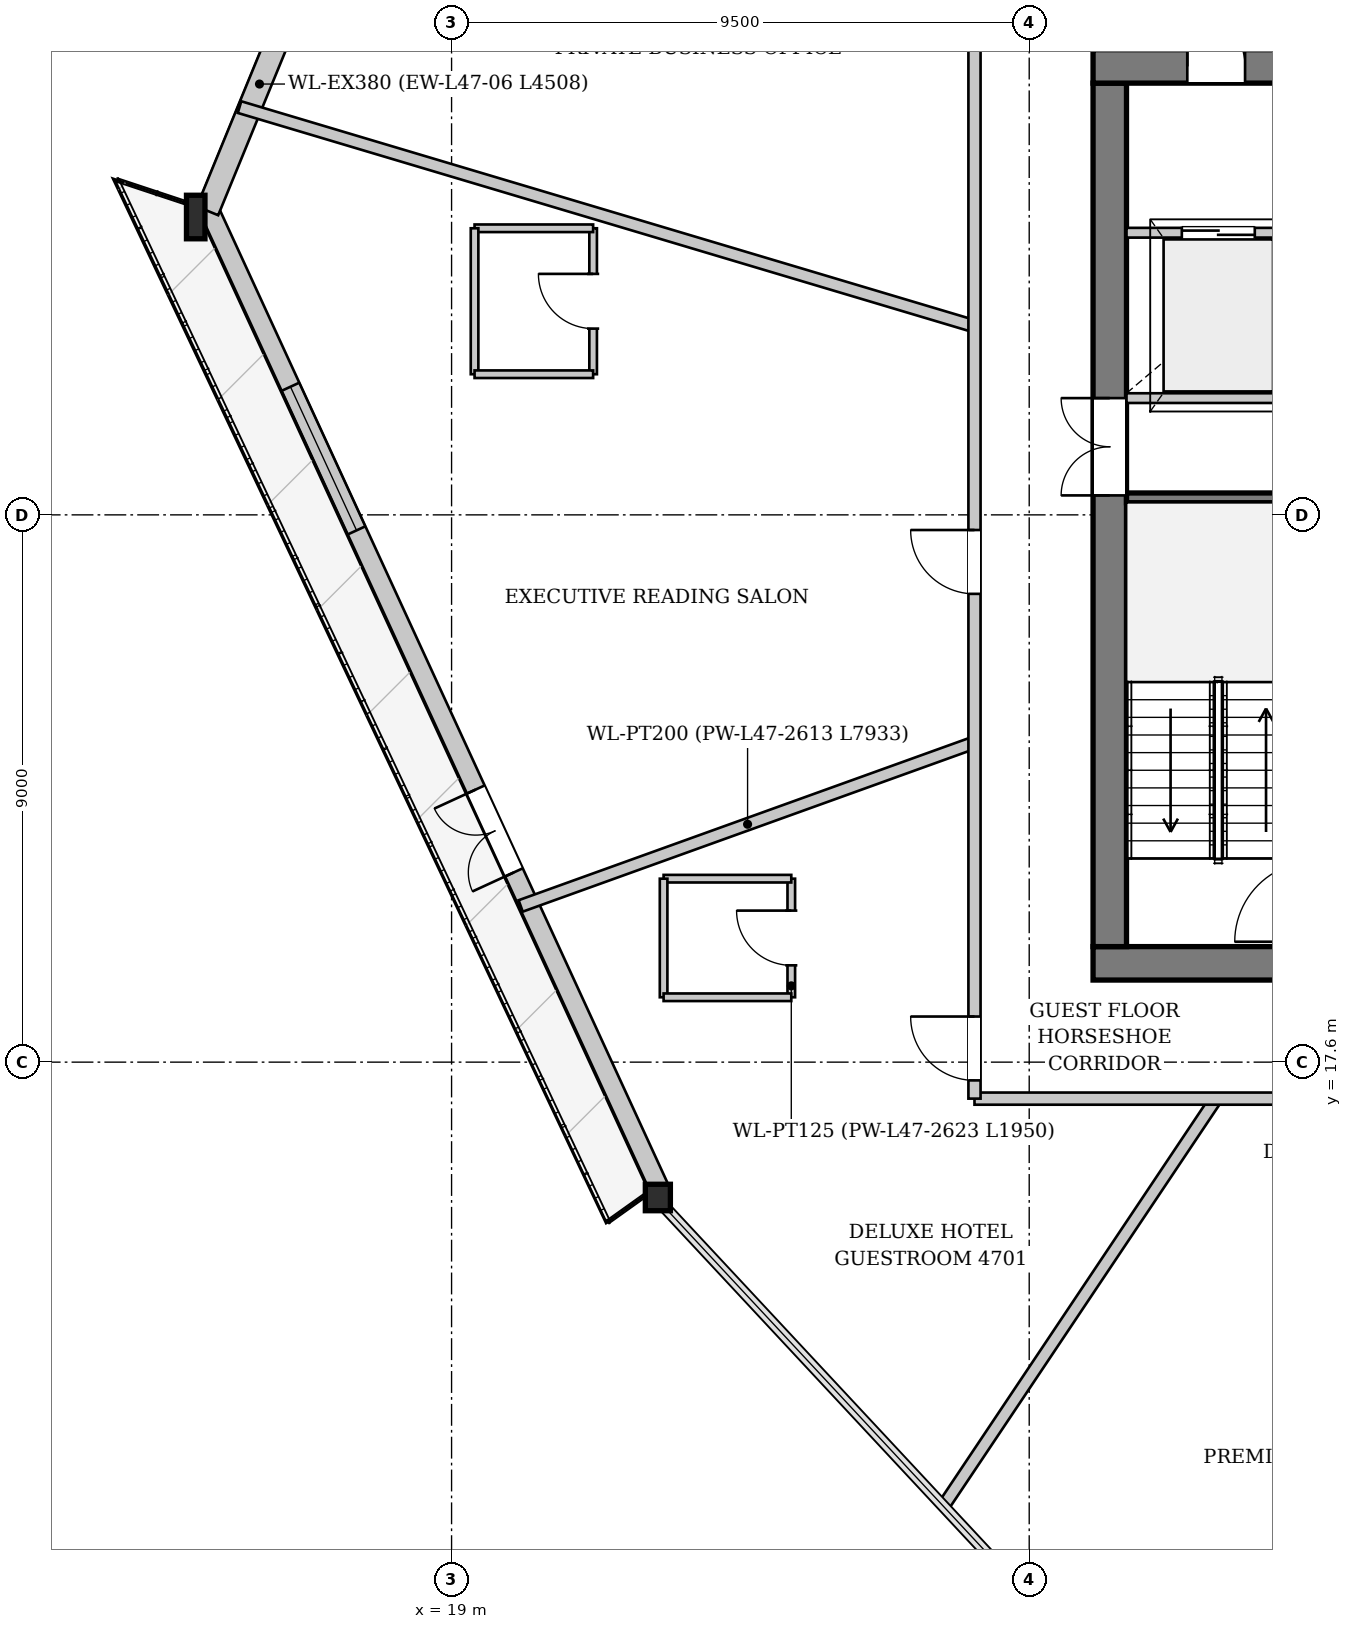
"""IFC4 building model, lengths in metres.
Left out: names, types, materials, properties, quantities, classifications, styles, units other than length and angle.
Written with IfcOpenShell. Run it as: python <this file> out.ifc"""

import sys

from ifc_helpers import new_model, si_unit, direction, frame, frame_2d, origin, origin_2d, place, context, subcontext, project, spatial, rectangle, i_section, extrude, source, transform, mapped, element, fill, save


model = new_model("IFC4")
c1 = context("Model", 3, precision=1e-05, world=origin(), true_north=direction((0.0, 1.0)))
c2 = subcontext(c1, "Body", "Model", "MODEL_VIEW")
j1 = project(units=[si_unit("LENGTHUNIT", "METRE"), si_unit("PLANEANGLEUNIT", "RADIAN")], contexts=[c1])
p1 = place(None, origin())
s1 = spatial("IfcSite", under=j1, at=p1, CompositionType="ELEMENT")
p2 = place(p1, origin())
s2 = spatial("IfcBuilding", under=s1, at=p2, CompositionType="ELEMENT")
p3 = place(p2, frame((0.0, 0.0, 178.55)))
s3 = spatial("IfcBuildingStorey", under=s2, at=p3, CompositionType="ELEMENT", Elevation=178.55)
m1 = source(origin(), c2, "Body", "SweptSolid", [
    extrude(i_section(OverallWidth=0.304, OverallDepth=0.716, WebThickness=0.021, FlangeThickness=0.04, at=origin_2d()), origin(), (0.0, 0.0, 1.0), 3.403),
])
p4 = place(p3, frame((14.81, 31.672, 0.0), z_axis=(-0.010402853053, -0.102019703729, 0.994727983269), x_axis=(0.994841349494, -0.101443034934, 0.0)))
e1 = element("IfcColumn", 1, at=p4, inside=s3, PredefinedType="COLUMN", context=c2, shape_type="MappedRepresentation", body=[
    mapped(m1, transform((0.0, 0.0, 0.0), x_axis=(1.0, 0.0, 0.0), y_axis=(0.0, 1.0, 0.0), z_axis=(0.0, 0.0, 1.0), scale=1.0)),
])
m2 = source(origin(), c2, "Body", "SweptSolid", [
    extrude(i_section(OverallWidth=0.412, OverallDepth=0.435, WebThickness=0.031, FlangeThickness=0.05, at=origin_2d()), origin(), (0.0, 0.0, 1.0), 3.4),
])
p5 = place(p3, frame((22.266, 15.469, 0.0), z_axis=(0.074538045011, -0.05615486628, 0.99563583244), x_axis=(0.601722210695, 0.798705440795, 0.0)))
e2 = element("IfcColumn", 2, at=p5, inside=s3, PredefinedType="COLUMN", context=c2, shape_type="MappedRepresentation", body=[
    mapped(m2, transform((0.0, 0.0, 0.0), x_axis=(1.0, 0.0, 0.0), y_axis=(0.0, 1.0, 0.0), z_axis=(0.0, 0.0, 1.0), scale=1.0)),
])
p6 = place(p3, frame((22.411, 15.536, 0.0), z_axis=(0.0, 0.0, 1.0), x_axis=(-0.418042306269, 0.90842755912, 0.0)))
e3 = element("IfcWall", 3, at=p6, inside=s3, PredefinedType="SOLIDWALL", context=c2, shape_type="SweptSolid", body=[
    extrude(rectangle(XDim=17.836, YDim=0.32, at=frame_2d((8.918, 0.0))), origin(), (0.0, 0.0, 1.0), 2.722),
])
p7 = place(p6, frame((5.707, 0.0, 0.0)))
e4 = element("IfcOpeningElement", 4, at=p7, cuts=e3, PredefinedType="OPENING", context=c2, shape_type="SweptSolid", body=[
    extrude(rectangle(XDim=1.5, YDim=2.3, at=frame_2d((0.75, 1.15))), frame((0.0, 0.17, 0.0), z_axis=(0.0, -1.0, 0.0), x_axis=(1.0, 0.0, 0.0)), (0.0, 0.0, 1.0), 0.34),
])
p8 = place(p6, frame((11.898, 0.0, 0.252)))
e5 = element("IfcOpeningElement", 5, at=p8, cuts=e3, PredefinedType="OPENING", context=c2, shape_type="SweptSolid", body=[
    extrude(rectangle(XDim=2.6, YDim=2.35, at=frame_2d((1.3, 1.175))), frame((0.0, 0.17, 0.0), z_axis=(0.0, -1.0, 0.0), x_axis=(1.0, 0.0, 0.0)), (0.0, 0.0, 1.0), 0.34),
])
p9 = place(p3, frame((14.986, 31.6, 0.0), z_axis=(0.0, 0.0, 1.0), x_axis=(0.379425607081, 0.925222248269, 0.0)))
e6 = element("IfcWall", 6, at=p9, inside=s3, PredefinedType="SOLIDWALL", context=c2, shape_type="SweptSolid", body=[
    extrude(rectangle(XDim=4.508, YDim=0.38, at=frame_2d((2.254, 0.0))), origin(), (0.0, 0.0, 1.0), 2.722),
])
p10 = place(p3, frame((46.45, 19.225, 0.0), z_axis=(0.0, 0.0, 1.0), x_axis=(-1.0, 0.0, 0.0)))
e7 = element("IfcWall", 7, at=p10, inside=s3, PredefinedType="SHEAR", context=c2, shape_type="SweptSolid", body=[
    extrude(rectangle(XDim=16.9, YDim=0.55, at=frame_2d((8.45, 0.0))), origin(), (0.0, 0.0, 1.0), 3.33),
])
p11 = place(p10, frame((4.65, 0.0, 0.0)))
e8 = element("IfcOpeningElement", 8, at=p11, cuts=e7, PredefinedType="OPENING", context=c2, shape_type="SweptSolid", body=[
    extrude(rectangle(XDim=1.12, YDim=2.25, at=frame_2d((0.56, 1.125))), frame((0.0, 0.285, 0.0), z_axis=(0.0, -1.0, 0.0), x_axis=(1.0, 0.0, 0.0)), (0.0, 0.0, 1.0), 0.57),
])
p12 = place(p10, frame((11.15, 0.0, 0.0)))
e9 = element("IfcOpeningElement", 9, at=p12, cuts=e7, PredefinedType="OPENING", context=c2, shape_type="SweptSolid", body=[
    extrude(rectangle(XDim=1.12, YDim=2.25, at=frame_2d((0.56, 1.125))), frame((0.0, 0.285, 0.0), z_axis=(0.0, -1.0, 0.0), x_axis=(1.0, 0.0, 0.0)), (0.0, 0.0, 1.0), 0.57),
])
p13 = place(p3, frame((29.825, 19.5, 0.0), z_axis=(0.0, 0.0, 1.0), x_axis=(0.0, 1.0, 0.0)))
e10 = element("IfcWall", 10, at=p13, inside=s3, PredefinedType="SHEAR", context=c2, shape_type="SweptSolid", body=[
    extrude(rectangle(XDim=14.2, YDim=0.55, at=frame_2d((7.1, 0.0))), origin(), (0.0, 0.0, 1.0), 3.33),
])
p14 = place(p13, frame((7.42, 0.0, 0.0)))
e11 = element("IfcOpeningElement", 11, at=p14, cuts=e10, PredefinedType="OPENING", context=c2, shape_type="SweptSolid", body=[
    extrude(rectangle(XDim=1.6, YDim=2.2, at=frame_2d((0.8, 1.1))), frame((0.0, 0.285, 0.0), z_axis=(0.0, -1.0, 0.0), x_axis=(1.0, 0.0, 0.0)), (0.0, 0.0, 1.0), 0.57),
])
p15 = place(p3, frame((29.55, 33.975, 0.0), z_axis=(0.0, 0.0, 1.0), x_axis=(1.0, 0.0, 0.0)))
e12 = element("IfcWall", 12, at=p15, inside=s3, PredefinedType="SHEAR", context=c2, shape_type="SweptSolid", body=[
    extrude(rectangle(XDim=16.9, YDim=0.55, at=frame_2d((8.45, 0.0))), origin(), (0.0, 0.0, 1.0), 3.33),
])
p16 = place(p15, frame((1.55, 0.0, 0.0)))
e13 = element("IfcOpeningElement", 13, at=p16, cuts=e12, PredefinedType="OPENING", context=c2, shape_type="SweptSolid", body=[
    extrude(rectangle(XDim=0.95, YDim=2.1, at=frame_2d((0.475, 1.05))), frame((0.0, 0.285, 0.0), z_axis=(0.0, -1.0, 0.0), x_axis=(1.0, 0.0, 0.0)), (0.0, 0.0, 1.0), 0.57),
])
p17 = place(p15, frame((3.93, 0.0, 0.0)))
e14 = element("IfcOpeningElement", 14, at=p17, cuts=e12, PredefinedType="OPENING", context=c2, shape_type="SweptSolid", body=[
    extrude(rectangle(XDim=1.32, YDim=2.2, at=frame_2d((0.66, 1.1))), frame((0.0, 0.285, 0.0), z_axis=(0.0, -1.0, 0.0), x_axis=(1.0, 0.0, 0.0)), (0.0, 0.0, 1.0), 0.57),
])
for number, where, z_axis, x_axis in (
    (15, (30.1, 26.88, 0.0), (0.0, 0.0, 1.0), (1.0, 0.0, 0.0)),
    (16, (30.1, 28.52, 0.0), (0.0, 0.0, 1.0), (1.0, 0.0, 0.0)),
):
    element("IfcWall", number, at=place(p3, frame(where, z_axis=z_axis, x_axis=x_axis)), inside=s3, PredefinedType="PARTITIONING", context=c2, shape_type="SweptSolid", body=[
        extrude(rectangle(XDim=3.02, YDim=0.16, at=frame_2d((1.51, 0.0))), origin(), (0.0, 0.0, 1.0), 3.33),
    ])
p18 = place(p3, frame((30.1, 31.24, 0.0), z_axis=(0.0, 0.0, 1.0), x_axis=(1.0, 0.0, 0.0)))
e17 = element("IfcWall", 17, at=p18, inside=s3, PredefinedType="PARTITIONING", context=c2, shape_type="SweptSolid", body=[
    extrude(rectangle(XDim=3.02, YDim=0.16, at=frame_2d((1.51, 0.0))), origin(), (0.0, 0.0, 1.0), 3.33),
])
p19 = place(p18, frame((0.91, 0.0, 0.0)))
e18 = element("IfcOpeningElement", 18, at=p19, cuts=e17, PredefinedType="OPENING", context=c2, shape_type="SweptSolid", body=[
    extrude(rectangle(XDim=1.2, YDim=2.2, at=frame_2d((0.6, 1.1))), frame((0.0, 0.09, 0.0), z_axis=(0.0, -1.0, 0.0), x_axis=(1.0, 0.0, 0.0)), (0.0, 0.0, 1.0), 0.18),
])
p20 = place(p3, frame((27.6, 22.856, 0.0), z_axis=(0.0, 0.0, 1.0), x_axis=(-0.94088309604, -0.338731456446, 0.0)))
e19 = element("IfcWall", 19, at=p20, inside=s3, PredefinedType="PARTITIONING", context=c2, shape_type="SweptSolid", body=[
    extrude(rectangle(XDim=7.933, YDim=0.2, at=frame_2d((3.966, 0.0))), origin(), (0.0, 0.0, 1.0), 3.33),
])
p21 = place(p3, frame((31.574, 17.0, 0.0), z_axis=(0.0, 0.0, 1.0), x_axis=(-0.556234798173, -0.831025179704, 0.0)))
e20 = element("IfcWall", 20, at=p21, inside=s3, PredefinedType="PARTITIONING", context=c2, shape_type="SweptSolid", body=[
    extrude(rectangle(XDim=8.035, YDim=0.2, at=frame_2d((4.018, 0.0))), origin(), (0.0, 0.0, 1.0), 3.33),
])
p22 = place(p3, frame((27.6, 29.701, 0.0), z_axis=(0.0, 0.0, 1.0), x_axis=(-0.958300687038, 0.285761777048, 0.0)))
e21 = element("IfcWall", 21, at=p22, inside=s3, PredefinedType="PARTITIONING", context=c2, shape_type="SweptSolid", body=[
    extrude(rectangle(XDim=12.614, YDim=0.2, at=frame_2d((6.307, 0.0))), origin(), (0.0, 0.0, 1.0), 3.33),
])
p23 = place(p3, frame((24.587, 18.667, 0.0), z_axis=(0.0, 0.0, 1.0), x_axis=(0.0, 1.0, 0.0)))
e22 = element("IfcWall", 22, at=p23, inside=s3, PredefinedType="PARTITIONING", context=c2, shape_type="SweptSolid", body=[
    extrude(rectangle(XDim=1.95, YDim=0.125, at=frame_2d((0.975, 0.0))), origin(), (0.0, 0.0, 1.0), 2.955),
])
p24 = place(p23, frame((0.525, 0.0, 0.0)))
e23 = element("IfcOpeningElement", 23, at=p24, cuts=e22, PredefinedType="OPENING", context=c2, shape_type="SweptSolid", body=[
    extrude(rectangle(XDim=0.9, YDim=2.1, at=frame_2d((0.45, 1.05))), frame((0.0, 0.073, 0.0), z_axis=(0.0, -1.0, 0.0), x_axis=(1.0, 0.0, 0.0)), (0.0, 0.0, 1.0), 0.145),
])
p25 = place(p3, frame((24.587, 20.617, 0.0), z_axis=(0.0, 0.0, 1.0), x_axis=(-1.0, 0.0, 0.0)))
e24 = element("IfcWall", 24, at=p25, inside=s3, PredefinedType="PARTITIONING", context=c2, shape_type="SweptSolid", body=[
    extrude(rectangle(XDim=2.1, YDim=0.125, at=frame_2d((1.05, 0.0))), origin(), (0.0, 0.0, 1.0), 3.33),
])
p26 = place(p3, frame((22.487, 20.617, 0.0), z_axis=(0.0, 0.0, 1.0), x_axis=(0.0, -1.0, 0.0)))
e25 = element("IfcWall", 25, at=p26, inside=s3, PredefinedType="PARTITIONING", context=c2, shape_type="SweptSolid", body=[
    extrude(rectangle(XDim=1.95, YDim=0.125, at=frame_2d((0.975, 0.0))), origin(), (0.0, 0.0, 1.0), 3.33),
])
p27 = place(p3, frame((22.487, 18.667, 0.0), z_axis=(0.0, 0.0, 1.0), x_axis=(1.0, 0.0, 0.0)))
e26 = element("IfcWall", 26, at=p27, inside=s3, PredefinedType="PARTITIONING", context=c2, shape_type="SweptSolid", body=[
    extrude(rectangle(XDim=2.1, YDim=0.125, at=frame_2d((1.05, 0.0))), origin(), (0.0, 0.0, 1.0), 3.33),
])
p28 = place(p3, frame((21.328, 28.913, 0.0), z_axis=(0.0, 0.0, 1.0), x_axis=(0.0, 1.0, 0.0)))
e27 = element("IfcWall", 27, at=p28, inside=s3, PredefinedType="PARTITIONING", context=c2, shape_type="SweptSolid", body=[
    extrude(rectangle(XDim=2.4, YDim=0.125, at=frame_2d((1.2, 0.0))), origin(), (0.0, 0.0, 1.0), 2.955),
])
p29 = place(p28, frame((0.75, 0.0, 0.0)))
e28 = element("IfcOpeningElement", 28, at=p29, cuts=e27, PredefinedType="OPENING", context=c2, shape_type="SweptSolid", body=[
    extrude(rectangle(XDim=0.9, YDim=2.1, at=frame_2d((0.45, 1.05))), frame((0.0, 0.073, 0.0), z_axis=(0.0, -1.0, 0.0), x_axis=(1.0, 0.0, 0.0)), (0.0, 0.0, 1.0), 0.145),
])
p30 = place(p3, frame((21.328, 31.313, 0.0), z_axis=(0.0, 0.0, 1.0), x_axis=(-1.0, 0.0, 0.0)))
e29 = element("IfcWall", 29, at=p30, inside=s3, PredefinedType="PARTITIONING", context=c2, shape_type="SweptSolid", body=[
    extrude(rectangle(XDim=1.95, YDim=0.125, at=frame_2d((0.975, 0.0))), origin(), (0.0, 0.0, 1.0), 3.33),
])
p31 = place(p3, frame((19.378, 31.313, 0.0), z_axis=(0.0, 0.0, 1.0), x_axis=(0.0, -1.0, 0.0)))
e30 = element("IfcWall", 30, at=p31, inside=s3, PredefinedType="PARTITIONING", context=c2, shape_type="SweptSolid", body=[
    extrude(rectangle(XDim=2.4, YDim=0.125, at=frame_2d((1.2, 0.0))), origin(), (0.0, 0.0, 1.0), 3.33),
])
p32 = place(p3, frame((19.378, 28.913, 0.0), z_axis=(0.0, 0.0, 1.0), x_axis=(1.0, 0.0, 0.0)))
e31 = element("IfcWall", 31, at=p32, inside=s3, PredefinedType="PARTITIONING", context=c2, shape_type="SweptSolid", body=[
    extrude(rectangle(XDim=1.95, YDim=0.125, at=frame_2d((0.975, 0.0))), origin(), (0.0, 0.0, 1.0), 3.33),
])
p33 = place(p3, frame((27.6, 17.0, 0.0), z_axis=(0.0, 0.0, 1.0), x_axis=(1.0, 0.0, 0.0)))
e32 = element("IfcWall", 32, at=p33, inside=s3, PredefinedType="PARTITIONING", context=c2, shape_type="SweptSolid", body=[
    extrude(rectangle(XDim=20.8, YDim=0.2, at=frame_2d((10.4, 0.0))), origin(), (0.0, 0.0, 1.0), 3.33),
])
p34 = place(p33, frame((5.92, 0.0, 0.0)))
e33 = element("IfcOpeningElement", 33, at=p34, cuts=e32, PredefinedType="OPENING", context=c2, shape_type="SweptSolid", body=[
    extrude(rectangle(XDim=1.05, YDim=2.2, at=frame_2d((0.525, 1.1))), frame((0.0, 0.11, 0.0), z_axis=(0.0, -1.0, 0.0), x_axis=(1.0, 0.0, 0.0)), (0.0, 0.0, 1.0), 0.22),
])
p35 = place(p33, frame((14.844, 0.0, 0.0)))
e34 = element("IfcOpeningElement", 34, at=p35, cuts=e32, PredefinedType="OPENING", context=c2, shape_type="SweptSolid", body=[
    extrude(rectangle(XDim=1.05, YDim=2.2, at=frame_2d((0.525, 1.1))), frame((0.0, 0.11, 0.0), z_axis=(0.0, -1.0, 0.0), x_axis=(1.0, 0.0, 0.0)), (0.0, 0.0, 1.0), 0.22),
])
p36 = place(p33, frame((19.45, 0.0, 0.0)))
e35 = element("IfcOpeningElement", 35, at=p36, cuts=e32, PredefinedType="OPENING", context=c2, shape_type="SweptSolid", body=[
    extrude(rectangle(XDim=1.05, YDim=2.2, at=frame_2d((0.525, 1.1))), frame((0.0, 0.11, 0.0), z_axis=(0.0, -1.0, 0.0), x_axis=(1.0, 0.0, 0.0)), (0.0, 0.0, 1.0), 0.22),
])
p37 = place(p3, frame((27.6, 17.0, 0.0), z_axis=(0.0, 0.0, 1.0), x_axis=(0.0, 1.0, 0.0)))
e36 = element("IfcWall", 36, at=p37, inside=s3, PredefinedType="PARTITIONING", context=c2, shape_type="SweptSolid", body=[
    extrude(rectangle(XDim=19.2, YDim=0.2, at=frame_2d((9.6, 0.0))), origin(), (0.0, 0.0, 1.0), 3.33),
])
p38 = place(p37, frame((0.3, 0.0, 0.0)))
e37 = element("IfcOpeningElement", 37, at=p38, cuts=e36, PredefinedType="OPENING", context=c2, shape_type="SweptSolid", body=[
    extrude(rectangle(XDim=1.05, YDim=2.2, at=frame_2d((0.525, 1.1))), frame((0.0, 0.11, 0.0), z_axis=(0.0, -1.0, 0.0), x_axis=(1.0, 0.0, 0.0)), (0.0, 0.0, 1.0), 0.22),
])
p39 = place(p37, frame((17.85, 0.0, 0.0)))
e38 = element("IfcOpeningElement", 38, at=p39, cuts=e36, PredefinedType="OPENING", context=c2, shape_type="SweptSolid", body=[
    extrude(rectangle(XDim=1.05, YDim=2.2, at=frame_2d((0.525, 1.1))), frame((0.0, 0.11, 0.0), z_axis=(0.0, -1.0, 0.0), x_axis=(1.0, 0.0, 0.0)), (0.0, 0.0, 1.0), 0.22),
])
p40 = place(p37, frame((8.301, 0.0, 0.0)))
e39 = element("IfcOpeningElement", 39, at=p40, cuts=e36, PredefinedType="OPENING", context=c2, shape_type="SweptSolid", body=[
    extrude(rectangle(XDim=1.05, YDim=2.2, at=frame_2d((0.525, 1.1))), frame((0.0, 0.11, 0.0), z_axis=(0.0, -1.0, 0.0), x_axis=(1.0, 0.0, 0.0)), (0.0, 0.0, 1.0), 0.22),
])
m3 = source(origin(), c2, "Body", "SweptSolid", [
    extrude(rectangle(XDim=1.5, YDim=2.3, at=frame_2d((0.75, 1.15))), frame((0.0, 0.025, 0.0), z_axis=(0.0, -1.0, 0.0), x_axis=(1.0, 0.0, 0.0)), (0.0, 0.0, 1.0), 0.05),
])
p41 = place(p7, origin())
e40 = element("IfcDoor", 40, at=p41, inside=s3, OperationType="DOUBLE_DOOR_SINGLE_SWING", PredefinedType="DOOR", context=c2, shape_type="MappedRepresentation", body=[
    mapped(m3, transform((0.0, 0.0, 0.0), x_axis=(1.0, 0.0, 0.0), y_axis=(0.0, 1.0, 0.0), z_axis=(0.0, 0.0, 1.0), scale=1.0)),
])
fill(e4, e40)
m4 = source(origin(), c2, "Body", "SweptSolid", [
    extrude(rectangle(XDim=2.6, YDim=2.35, at=frame_2d((1.3, 1.175))), frame((0.0, 0.03, 0.0), z_axis=(0.0, -1.0, 0.0), x_axis=(1.0, 0.0, 0.0)), (0.0, 0.0, 1.0), 0.06),
])
p42 = place(p8, origin())
e41 = element("IfcWindow", 41, at=p42, inside=s3, PartitioningType="SINGLE_PANEL", PredefinedType="WINDOW", context=c2, shape_type="MappedRepresentation", body=[
    mapped(m4, transform((0.0, 0.0, 0.0), x_axis=(1.0, 0.0, 0.0), y_axis=(0.0, 1.0, 0.0), z_axis=(0.0, 0.0, 1.0), scale=1.0)),
])
fill(e5, e41)
m5 = source(origin(), c2, "Body", "SweptSolid", [
    extrude(rectangle(XDim=1.6, YDim=2.2, at=frame_2d((0.8, 1.1))), frame((0.0, 0.025, 0.0), z_axis=(0.0, -1.0, 0.0), x_axis=(1.0, 0.0, 0.0)), (0.0, 0.0, 1.0), 0.05),
])
p43 = place(p14, origin())
e42 = element("IfcDoor", 42, at=p43, inside=s3, OperationType="DOUBLE_DOOR_SINGLE_SWING", PredefinedType="DOOR", context=c2, shape_type="MappedRepresentation", body=[
    mapped(m5, transform((0.0, 0.0, 0.0), x_axis=(1.0, 0.0, 0.0), y_axis=(0.0, 1.0, 0.0), z_axis=(0.0, 0.0, 1.0), scale=1.0)),
])
fill(e11, e42)
m6 = source(origin(), c2, "Body", "SweptSolid", [
    extrude(rectangle(XDim=0.95, YDim=2.1, at=frame_2d((0.475, 1.05))), frame((0.0, 0.025, 0.0), z_axis=(0.0, -1.0, 0.0), x_axis=(1.0, 0.0, 0.0)), (0.0, 0.0, 1.0), 0.05),
])
p44 = place(p16, origin())
e43 = element("IfcDoor", 43, at=p44, inside=s3, OperationType="SINGLE_SWING_LEFT", PredefinedType="DOOR", context=c2, shape_type="MappedRepresentation", body=[
    mapped(m6, transform((0.0, 0.0, 0.0), x_axis=(1.0, 0.0, 0.0), y_axis=(0.0, 1.0, 0.0), z_axis=(0.0, 0.0, 1.0), scale=1.0)),
])
fill(e13, e43)
m7 = source(origin(), c2, "Body", "SweptSolid", [
    extrude(rectangle(XDim=1.2, YDim=2.2, at=frame_2d((0.6, 1.1))), frame((0.0, 0.025, 0.0), z_axis=(0.0, -1.0, 0.0), x_axis=(1.0, 0.0, 0.0)), (0.0, 0.0, 1.0), 0.05),
])
p45 = place(p19, origin())
e44 = element("IfcDoor", 44, at=p45, inside=s3, OperationType="DOUBLE_DOOR_SLIDING", PredefinedType="DOOR", context=c2, shape_type="MappedRepresentation", body=[
    mapped(m7, transform((0.0, 0.0, 0.0), x_axis=(1.0, 0.0, 0.0), y_axis=(0.0, 1.0, 0.0), z_axis=(0.0, 0.0, 1.0), scale=1.0)),
])
fill(e18, e44)
m8 = source(origin(), c2, "Body", "SweptSolid", [
    extrude(rectangle(XDim=0.9, YDim=2.1, at=frame_2d((0.45, 1.05))), frame((0.0, 0.025, 0.0), z_axis=(0.0, -1.0, 0.0), x_axis=(1.0, 0.0, 0.0)), (0.0, 0.0, 1.0), 0.05),
])
p46 = place(p24, origin())
e45 = element("IfcDoor", 45, at=p46, inside=s3, OperationType="SINGLE_SWING_RIGHT", PredefinedType="DOOR", context=c2, shape_type="MappedRepresentation", body=[
    mapped(m8, transform((0.0, 0.0, 0.0), x_axis=(1.0, 0.0, 0.0), y_axis=(0.0, 1.0, 0.0), z_axis=(0.0, 0.0, 1.0), scale=1.0)),
])
fill(e23, e45)
p47 = place(p29, origin())
e46 = element("IfcDoor", 46, at=p47, inside=s3, OperationType="SINGLE_SWING_RIGHT", PredefinedType="DOOR", context=c2, shape_type="MappedRepresentation", body=[
    mapped(m8, transform((0.0, 0.0, 0.0), x_axis=(1.0, 0.0, 0.0), y_axis=(0.0, 1.0, 0.0), z_axis=(0.0, 0.0, 1.0), scale=1.0)),
])
fill(e28, e46)
m9 = source(origin(), c2, "Body", "SweptSolid", [
    extrude(rectangle(XDim=1.05, YDim=2.2, at=frame_2d((0.525, 1.1))), frame((0.0, 0.025, 0.0), z_axis=(0.0, -1.0, 0.0), x_axis=(1.0, 0.0, 0.0)), (0.0, 0.0, 1.0), 0.05),
])
p48 = place(p38, origin())
e47 = element("IfcDoor", 47, at=p48, inside=s3, OperationType="SINGLE_SWING_RIGHT", PredefinedType="DOOR", context=c2, shape_type="MappedRepresentation", body=[
    mapped(m9, transform((0.0, 0.0, 0.0), x_axis=(1.0, 0.0, 0.0), y_axis=(0.0, 1.0, 0.0), z_axis=(0.0, 0.0, 1.0), scale=1.0)),
])
fill(e37, e47)
p49 = place(p40, origin())
e48 = element("IfcDoor", 48, at=p49, inside=s3, OperationType="SINGLE_SWING_RIGHT", PredefinedType="DOOR", context=c2, shape_type="MappedRepresentation", body=[
    mapped(m9, transform((0.0, 0.0, 0.0), x_axis=(1.0, 0.0, 0.0), y_axis=(0.0, 1.0, 0.0), z_axis=(0.0, 0.0, 1.0), scale=1.0)),
])
fill(e39, e48)
save(model, sys.argv[1])
